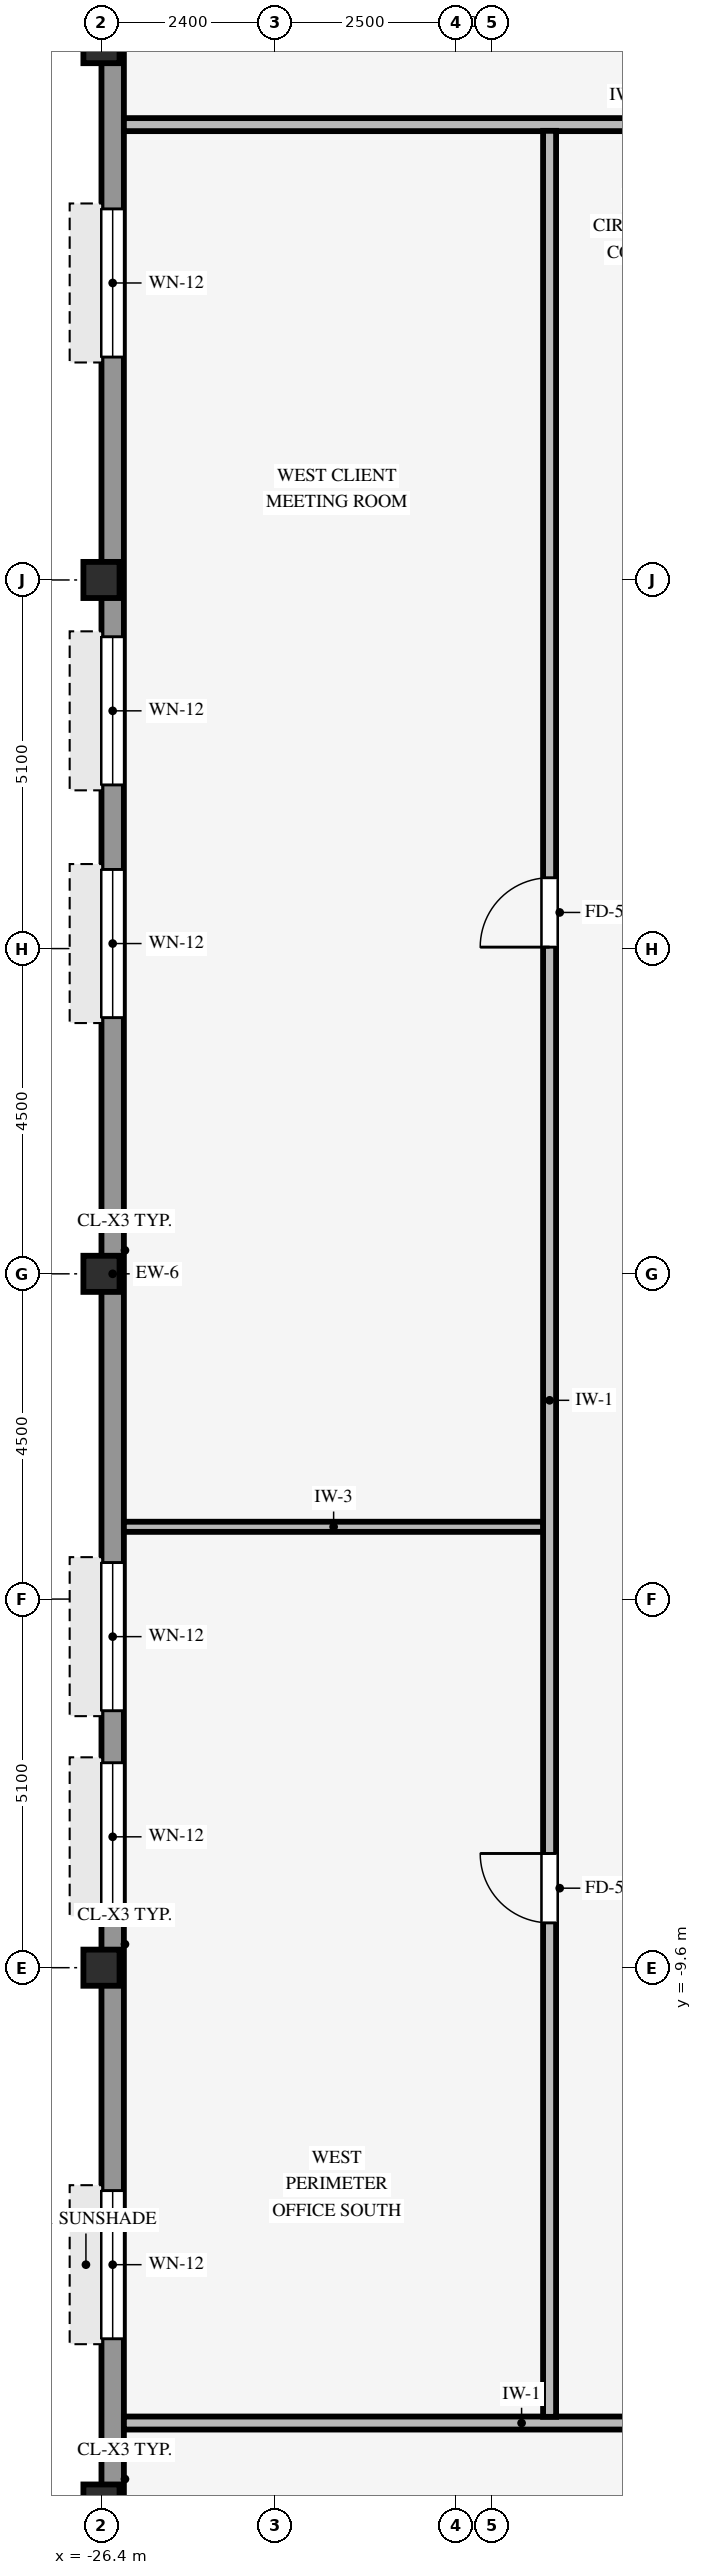
"""IFC4 building model, lengths in metres.
Left out: names, types, materials, properties, quantities, classifications, styles, units other than length and angle.
Written with IfcOpenShell. Run it as: python <this file> out.ifc"""

import sys

from ifc_helpers import new_model, si_unit, direction, frame, frame_2d, origin, origin_2d, place, context, subcontext, project, spatial, rectangle, hollow_rectangle, extrude, source, transform, mapped, element, fill, save


model = new_model("IFC4")
c1 = context("Model", 3, precision=1e-05, world=origin(), true_north=direction((0.0, 1.0)))
c2 = subcontext(c1, "Body", "Model", "MODEL_VIEW")
j1 = project(units=[si_unit("LENGTHUNIT", "METRE"), si_unit("PLANEANGLEUNIT", "RADIAN")], contexts=[c1])
p1 = place(None, origin())
s1 = spatial("IfcSite", under=j1, at=p1, CompositionType="ELEMENT")
p2 = place(p1, origin())
s2 = spatial("IfcBuilding", under=s1, at=p2, CompositionType="ELEMENT")
p3 = place(p2, frame((0.0, 0.0, 212.8)))
s3 = spatial("IfcBuildingStorey", under=s2, at=p3, CompositionType="ELEMENT", Elevation=212.8)
for number, where, z_axis, x_axis in (
    (1, (-26.4, -17.0, 0.0), (0.0, 0.0, 1.0), (1.0, 0.0, 0.0)),
    (2, (-26.4, -9.6, 0.0), (0.0, 0.0, 1.0), (1.0, 0.0, 0.0)),
    (3, (-26.4, 0.0, 0.0), (0.0, 0.0, 1.0), (1.0, 0.0, 0.0)),
    (4, (-26.4, 9.6, 0.0), (0.0, 0.0, 1.0), (1.0, 0.0, 0.0)),
    (5, (-26.4, 17.0, 0.0), (0.0, 0.0, 1.0), (1.0, 0.0, 0.0)),
):
    element("IfcColumn", number, at=place(p3, frame(where, z_axis=z_axis, x_axis=x_axis)), inside=s3, PredefinedType="COLUMN", context=c2, shape_type="SweptSolid", body=[
        extrude(hollow_rectangle(XDim=0.5, YDim=0.5, WallThickness=0.032, InnerFilletRadius=0.032, OuterFilletRadius=0.064, at=origin_2d()), origin(), (0.0, 0.0, 1.0), 3.37),
    ])
p4 = place(p3, frame((-26.245, -16.994, 0.0), z_axis=(0.0, 0.0, 1.0), x_axis=(0.0, 1.0, 0.0)))
e6 = element("IfcWall", 6, at=p4, inside=s3, PredefinedType="STANDARD", context=c2, shape_type="SweptSolid", body=[
    extrude(rectangle(XDim=33.988, YDim=0.31, at=frame_2d((16.994, 0.0))), origin(), (0.0, 0.0, 1.0), 2.705),
])
p5 = place(p4, frame((2.26, 0.0, 0.8)))
e7 = element("IfcOpeningElement", 7, at=p5, cuts=e6, PredefinedType="OPENING", context=c2, shape_type="SweptSolid", body=[
    extrude(rectangle(XDim=2.05, YDim=1.52, at=frame_2d((1.025, 0.76))), frame((0.0, 0.165, 0.0), z_axis=(0.0, -1.0, 0.0), x_axis=(1.0, 0.0, 0.0)), (0.0, 0.0, 1.0), 0.33),
])
p6 = place(p4, frame((8.18, 0.0, 0.8)))
e8 = element("IfcOpeningElement", 8, at=p6, cuts=e6, PredefinedType="OPENING", context=c2, shape_type="SweptSolid", body=[
    extrude(rectangle(XDim=2.05, YDim=1.52, at=frame_2d((1.025, 0.76))), frame((0.0, 0.165, 0.0), z_axis=(0.0, -1.0, 0.0), x_axis=(1.0, 0.0, 0.0)), (0.0, 0.0, 1.0), 0.33),
])
p7 = place(p4, frame((10.949, 0.0, 0.8)))
e9 = element("IfcOpeningElement", 9, at=p7, cuts=e6, PredefinedType="OPENING", context=c2, shape_type="SweptSolid", body=[
    extrude(rectangle(XDim=2.05, YDim=1.52, at=frame_2d((1.025, 0.76))), frame((0.0, 0.165, 0.0), z_axis=(0.0, -1.0, 0.0), x_axis=(1.0, 0.0, 0.0)), (0.0, 0.0, 1.0), 0.33),
])
p8 = place(p4, frame((20.539, 0.0, 0.8)))
e10 = element("IfcOpeningElement", 10, at=p8, cuts=e6, PredefinedType="OPENING", context=c2, shape_type="SweptSolid", body=[
    extrude(rectangle(XDim=2.05, YDim=1.52, at=frame_2d((1.025, 0.76))), frame((0.0, 0.165, 0.0), z_axis=(0.0, -1.0, 0.0), x_axis=(1.0, 0.0, 0.0)), (0.0, 0.0, 1.0), 0.33),
])
p9 = place(p4, frame((23.758, 0.0, 0.8)))
e11 = element("IfcOpeningElement", 11, at=p9, cuts=e6, PredefinedType="OPENING", context=c2, shape_type="SweptSolid", body=[
    extrude(rectangle(XDim=2.05, YDim=1.52, at=frame_2d((1.025, 0.76))), frame((0.0, 0.165, 0.0), z_axis=(0.0, -1.0, 0.0), x_axis=(1.0, 0.0, 0.0)), (0.0, 0.0, 1.0), 0.33),
])
p10 = place(p4, frame((29.678, 0.0, 0.8)))
e12 = element("IfcOpeningElement", 12, at=p10, cuts=e6, PredefinedType="OPENING", context=c2, shape_type="SweptSolid", body=[
    extrude(rectangle(XDim=2.05, YDim=1.52, at=frame_2d((1.025, 0.76))), frame((0.0, 0.165, 0.0), z_axis=(0.0, -1.0, 0.0), x_axis=(1.0, 0.0, 0.0)), (0.0, 0.0, 1.0), 0.33),
])
p11 = place(p3, frame((-26.09, -15.9, 0.0), z_axis=(0.0, 0.0, 1.0), x_axis=(1.0, 0.0, 0.0)))
e13 = element("IfcWall", 13, at=p11, inside=s3, PredefinedType="PARTITIONING", context=c2, shape_type="SweptSolid", body=[
    extrude(rectangle(XDim=35.09, YDim=0.18, at=frame_2d((17.545, 0.0))), origin(), (0.0, 0.0, 1.0), 3.36),
])
p12 = place(p11, frame((23.605, 0.0, 0.0)))
e14 = element("IfcOpeningElement", 14, at=p12, cuts=e13, PredefinedType="OPENING", context=c2, shape_type="SweptSolid", body=[
    extrude(rectangle(XDim=0.96, YDim=2.1, at=frame_2d((0.48, 1.05))), frame((0.0, 0.1, 0.0), z_axis=(0.0, -1.0, 0.0), x_axis=(1.0, 0.0, 0.0)), (0.0, 0.0, 1.0), 0.2),
])
p13 = place(p11, frame((11.455, 0.0, 0.0)))
e15 = element("IfcOpeningElement", 15, at=p13, cuts=e13, PredefinedType="OPENING", context=c2, shape_type="SweptSolid", body=[
    extrude(rectangle(XDim=0.96, YDim=2.1, at=frame_2d((0.48, 1.05))), frame((0.0, 0.1, 0.0), z_axis=(0.0, -1.0, 0.0), x_axis=(1.0, 0.0, 0.0)), (0.0, 0.0, 1.0), 0.2),
])
p14 = place(p3, frame((-26.09, -3.5, 0.0), z_axis=(0.0, 0.0, 1.0), x_axis=(1.0, 0.0, 0.0)))
e16 = element("IfcWall", 16, at=p14, inside=s3, PredefinedType="PARTITIONING", context=c2, shape_type="SweptSolid", body=[
    extrude(rectangle(XDim=5.804, YDim=0.14, at=frame_2d((2.902, 0.0))), origin(), (0.0, 0.0, 1.0), 3.36),
])
p15 = place(p3, frame((-26.09, 15.9, 0.0), z_axis=(0.0, 0.0, 1.0), x_axis=(1.0, 0.0, 0.0)))
e17 = element("IfcWall", 17, at=p15, inside=s3, PredefinedType="PARTITIONING", context=c2, shape_type="SweptSolid", body=[
    extrude(rectangle(XDim=35.09, YDim=0.18, at=frame_2d((17.545, 0.0))), origin(), (0.0, 0.0, 1.0), 3.36),
])
p16 = place(p15, frame((14.415, 0.0, 0.0)))
e18 = element("IfcOpeningElement", 18, at=p16, cuts=e17, PredefinedType="OPENING", context=c2, shape_type="SweptSolid", body=[
    extrude(rectangle(XDim=0.96, YDim=2.1, at=frame_2d((0.48, 1.05))), frame((0.0, 0.1, 0.0), z_axis=(0.0, -1.0, 0.0), x_axis=(1.0, 0.0, 0.0)), (0.0, 0.0, 1.0), 0.2),
])
p17 = place(p15, frame((26.565, 0.0, 0.0)))
e19 = element("IfcOpeningElement", 19, at=p17, cuts=e17, PredefinedType="OPENING", context=c2, shape_type="SweptSolid", body=[
    extrude(rectangle(XDim=0.96, YDim=2.1, at=frame_2d((0.48, 1.05))), frame((0.0, 0.1, 0.0), z_axis=(0.0, -1.0, 0.0), x_axis=(1.0, 0.0, 0.0)), (0.0, 0.0, 1.0), 0.2),
])
p18 = place(p3, frame((-20.2, -15.814, 0.0), z_axis=(0.0, 0.0, 1.0), x_axis=(0.0, 1.0, 0.0)))
e20 = element("IfcWall", 20, at=p18, inside=s3, PredefinedType="PARTITIONING", context=c2, shape_type="SweptSolid", body=[
    extrude(rectangle(XDim=31.628, YDim=0.18, at=frame_2d((15.814, 0.0))), origin(), (0.0, 0.0, 1.0), 3.36),
])
p19 = place(p18, frame((20.334, 0.0, 0.0)))
e21 = element("IfcOpeningElement", 21, at=p19, cuts=e20, PredefinedType="OPENING", context=c2, shape_type="SweptSolid", body=[
    extrude(rectangle(XDim=0.96, YDim=2.1, at=frame_2d((0.48, 1.05))), frame((0.0, 0.1, 0.0), z_axis=(0.0, -1.0, 0.0), x_axis=(1.0, 0.0, 0.0)), (0.0, 0.0, 1.0), 0.2),
])
p20 = place(p18, frame((6.834, 0.0, 0.0)))
e22 = element("IfcOpeningElement", 22, at=p20, cuts=e20, PredefinedType="OPENING", context=c2, shape_type="SweptSolid", body=[
    extrude(rectangle(XDim=0.96, YDim=2.1, at=frame_2d((0.48, 1.05))), frame((0.0, 0.1, 0.0), z_axis=(0.0, -1.0, 0.0), x_axis=(1.0, 0.0, 0.0)), (0.0, 0.0, 1.0), 0.2),
])
m1 = source(origin(), c2, "Body", "SweptSolid", [
    extrude(rectangle(XDim=2.05, YDim=1.52, at=frame_2d((1.025, 0.76))), frame((0.0, 0.03, 0.0), z_axis=(0.0, -1.0, 0.0), x_axis=(1.0, 0.0, 0.0)), (0.0, 0.0, 1.0), 0.06),
])
p21 = place(p5, origin())
e23 = element("IfcWindow", 23, at=p21, inside=s3, PartitioningType="SINGLE_PANEL", PredefinedType="WINDOW", context=c2, shape_type="MappedRepresentation", body=[
    mapped(m1, transform((0.0, 0.0, 0.0), scale=1.0)),
])
fill(e7, e23)
p22 = place(p6, origin())
e24 = element("IfcWindow", 24, at=p22, inside=s3, PartitioningType="SINGLE_PANEL", PredefinedType="WINDOW", context=c2, shape_type="MappedRepresentation", body=[
    mapped(m1, transform((0.0, 0.0, 0.0), scale=1.0)),
])
fill(e8, e24)
p23 = place(p7, origin())
e25 = element("IfcWindow", 25, at=p23, inside=s3, PartitioningType="SINGLE_PANEL", PredefinedType="WINDOW", context=c2, shape_type="MappedRepresentation", body=[
    mapped(m1, transform((0.0, 0.0, 0.0), scale=1.0)),
])
fill(e9, e25)
p24 = place(p8, origin())
e26 = element("IfcWindow", 26, at=p24, inside=s3, PartitioningType="SINGLE_PANEL", PredefinedType="WINDOW", context=c2, shape_type="MappedRepresentation", body=[
    mapped(m1, transform((0.0, 0.0, 0.0), scale=1.0)),
])
fill(e10, e26)
p25 = place(p9, origin())
e27 = element("IfcWindow", 27, at=p25, inside=s3, PartitioningType="SINGLE_PANEL", PredefinedType="WINDOW", context=c2, shape_type="MappedRepresentation", body=[
    mapped(m1, transform((0.0, 0.0, 0.0), scale=1.0)),
])
fill(e11, e27)
p26 = place(p10, origin())
e28 = element("IfcWindow", 28, at=p26, inside=s3, PartitioningType="SINGLE_PANEL", PredefinedType="WINDOW", context=c2, shape_type="MappedRepresentation", body=[
    mapped(m1, transform((0.0, 0.0, 0.0), scale=1.0)),
])
fill(e12, e28)
m2 = source(origin(), c2, "Body", "SweptSolid", [
    extrude(rectangle(XDim=0.96, YDim=2.1, at=frame_2d((0.48, 1.05))), frame((0.0, 0.025, 0.0), z_axis=(0.0, -1.0, 0.0), x_axis=(1.0, 0.0, 0.0)), (0.0, 0.0, 1.0), 0.05),
])
p27 = place(p19, origin())
e29 = element("IfcDoor", 29, at=p27, inside=s3, OperationType="SINGLE_SWING_LEFT", PredefinedType="DOOR", context=c2, shape_type="MappedRepresentation", body=[
    mapped(m2, transform((0.0, 0.0, 0.0), scale=1.0)),
])
fill(e21, e29)
p28 = place(p20, origin())
e30 = element("IfcDoor", 30, at=p28, inside=s3, OperationType="SINGLE_SWING_RIGHT", PredefinedType="DOOR", context=c2, shape_type="MappedRepresentation", body=[
    mapped(m2, transform((0.0, 0.0, 0.0), scale=1.0)),
])
fill(e22, e30)
save(model, sys.argv[1])
